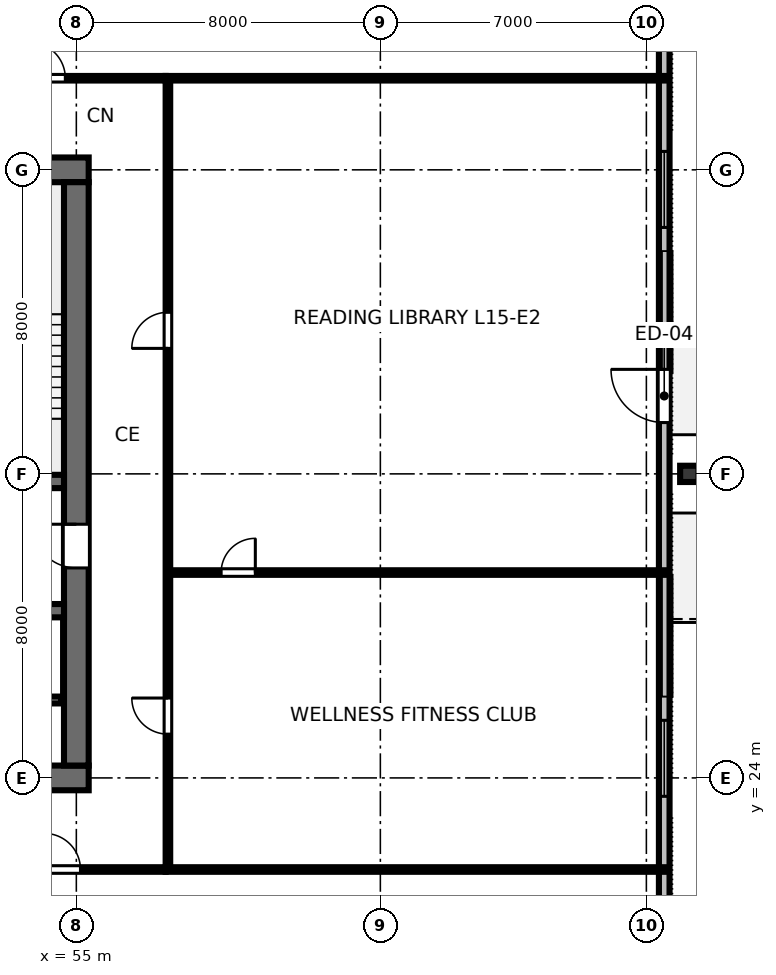
"""IFC4 building model, lengths in metres.
Left out: names, types, materials, properties, quantities, classifications, styles, units other than length and angle.
Written with IfcOpenShell. Run it as: python <this file> out.ifc"""

import sys

from ifc_helpers import new_model, si_unit, direction, frame, frame_2d, origin, origin_2d, place, context, subcontext, project, spatial, rectangle, i_section, extrude, element, fill, save


model = new_model("IFC4")
c1 = context("Model", 3, precision=1e-05, world=origin(), true_north=direction((0.0, 1.0)))
c2 = subcontext(c1, "Body", "Model", "MODEL_VIEW")
j1 = project(units=[si_unit("LENGTHUNIT", "METRE"), si_unit("PLANEANGLEUNIT", "RADIAN")], contexts=[c1])
p1 = place(None, origin())
s1 = spatial("IfcSite", under=j1, at=p1, CompositionType="ELEMENT")
p2 = place(p1, origin())
s2 = spatial("IfcBuilding", under=s1, at=p2, CompositionType="ELEMENT")
p3 = place(p2, frame((0.0, 0.0, 60.4)))
s3 = spatial("IfcBuildingStorey", under=s2, at=p3, CompositionType="ELEMENT", Elevation=60.4)
p4 = place(p3, frame((36.675, 24.0, 0.0), z_axis=(0.0, 0.0, 1.0), x_axis=(1.0, 0.0, 0.0)))
e1 = element("IfcWall", 1, at=p4, inside=s3, PredefinedType="SHEAR", context=c2, shape_type="SweptSolid", body=[
    extrude(rectangle(XDim=18.65, YDim=0.65, at=frame_2d((9.325, 0.0))), origin(), (0.0, 0.0, 1.0), 3.36),
])
p5 = place(p4, frame((5.725, 0.0, 0.0)))
e2 = element("IfcOpeningElement", 2, at=p5, cuts=e1, PredefinedType="OPENING", context=c2, shape_type="SweptSolid", body=[
    extrude(rectangle(XDim=1.6, YDim=2.15, at=frame_2d((0.8, 1.075))), frame((0.0, 0.335, 0.0), z_axis=(0.0, -1.0, 0.0), x_axis=(1.0, 0.0, 0.0)), (0.0, 0.0, 1.0), 0.67),
])
p6 = place(p4, frame((12.125, 0.0, 0.0)))
e3 = element("IfcOpeningElement", 3, at=p6, cuts=e1, PredefinedType="OPENING", context=c2, shape_type="SweptSolid", body=[
    extrude(rectangle(XDim=1.6, YDim=2.15, at=frame_2d((0.8, 1.075))), frame((0.0, 0.335, 0.0), z_axis=(0.0, -1.0, 0.0), x_axis=(1.0, 0.0, 0.0)), (0.0, 0.0, 1.0), 0.67),
])
p7 = place(p3, frame((36.675, 40.0, 0.0), z_axis=(0.0, 0.0, 1.0), x_axis=(1.0, 0.0, 0.0)))
e4 = element("IfcWall", 4, at=p7, inside=s3, PredefinedType="SHEAR", context=c2, shape_type="SweptSolid", body=[
    extrude(rectangle(XDim=18.65, YDim=0.65, at=frame_2d((9.325, 0.0))), origin(), (0.0, 0.0, 1.0), 3.36),
])
p8 = place(p7, frame((8.825, 0.0, 0.0)))
e5 = element("IfcOpeningElement", 5, at=p8, cuts=e4, PredefinedType="OPENING", context=c2, shape_type="SweptSolid", body=[
    extrude(rectangle(XDim=1.0, YDim=2.15, at=frame_2d((0.5, 1.075))), frame((0.0, 0.335, 0.0), z_axis=(0.0, -1.0, 0.0), x_axis=(1.0, 0.0, 0.0)), (0.0, 0.0, 1.0), 0.67),
])
p9 = place(p3, frame((55.0, 24.325, 0.0), z_axis=(0.0, 0.0, 1.0), x_axis=(0.0, 1.0, 0.0)))
e6 = element("IfcWall", 6, at=p9, inside=s3, PredefinedType="SHEAR", context=c2, shape_type="SweptSolid", body=[
    extrude(rectangle(XDim=15.35, YDim=0.65, at=frame_2d((7.675, 0.0))), origin(), (0.0, 0.0, 1.0), 3.36),
])
p10 = place(p9, frame((5.2, 0.0, 0.0)))
e7 = element("IfcOpeningElement", 7, at=p10, cuts=e6, PredefinedType="OPENING", context=c2, shape_type="SweptSolid", body=[
    extrude(rectangle(XDim=1.15, YDim=2.15, at=frame_2d((0.575, 1.075))), frame((0.0, 0.335, 0.0), z_axis=(0.0, -1.0, 0.0), x_axis=(1.0, 0.0, 0.0)), (0.0, 0.0, 1.0), 0.67),
])
p11 = place(p3, frame((37.325, 31.8, 0.0), z_axis=(0.0, 0.0, 1.0), x_axis=(1.0, 0.0, 0.0)))
e8 = element("IfcWall", 8, at=p11, inside=s3, PredefinedType="SHEAR", context=c2, shape_type="SweptSolid", body=[
    extrude(rectangle(XDim=17.35, YDim=0.35, at=frame_2d((8.675, 0.0))), origin(), (0.0, 0.0, 1.0), 3.36),
])
p12 = place(p11, frame((0.725, 0.0, 0.0)))
e9 = element("IfcOpeningElement", 9, at=p12, cuts=e8, PredefinedType="OPENING", context=c2, shape_type="SweptSolid", body=[
    extrude(rectangle(XDim=1.1, YDim=2.15, at=frame_2d((0.55, 1.075))), frame((0.0, 0.185, 0.0), z_axis=(0.0, -1.0, 0.0), x_axis=(1.0, 0.0, 0.0)), (0.0, 0.0, 1.0), 0.37),
])
p13 = place(p11, frame((14.625, 0.0, 0.0)))
e10 = element("IfcOpeningElement", 10, at=p13, cuts=e8, PredefinedType="OPENING", context=c2, shape_type="SweptSolid", body=[
    extrude(rectangle(XDim=1.1, YDim=2.15, at=frame_2d((0.55, 1.075))), frame((0.0, 0.185, 0.0), z_axis=(0.0, -1.0, 0.0), x_axis=(1.0, 0.0, 0.0)), (0.0, 0.0, 1.0), 0.37),
])
p14 = place(p3, frame((37.325, 28.4, 0.0), z_axis=(0.0, 0.0, 1.0), x_axis=(1.0, 0.0, 0.0)))
e11 = element("IfcWall", 11, at=p14, inside=s3, PredefinedType="SHEAR", context=c2, shape_type="SweptSolid", body=[
    extrude(rectangle(XDim=17.35, YDim=0.35, at=frame_2d((8.675, 0.0))), origin(), (0.0, 0.0, 1.0), 3.36),
])
p15 = place(p3, frame((71.13, 32.0, 0.0), z_axis=(0.0, 0.0, 1.0), x_axis=(0.0, 1.0, 0.0)))
e12 = element("IfcColumn", 12, at=p15, inside=s3, PredefinedType="COLUMN", context=c2, shape_type="SweptSolid", body=[
    extrude(i_section(OverallWidth=0.428, OverallDepth=0.483, WebThickness=0.051, FlangeThickness=0.082, FilletRadius=0.025, at=origin_2d()), origin(), (0.0, 0.0, 1.0), 3.358),
])
p16 = place(p3, frame((70.47, 14.06, 0.0), z_axis=(0.0, 0.0, 1.0), x_axis=(0.0, 1.0, 0.0)))
e13 = element("IfcWall", 13, at=p16, inside=s3, PredefinedType="STANDARD", context=c2, shape_type="SweptSolid", body=[
    extrude(rectangle(XDim=35.88, YDim=0.28, at=frame_2d((17.94, 0.0))), origin(), (0.0, 0.0, 1.0), 3.36),
])
p17 = place(p16, frame((19.29, 0.0, 0.0)))
e14 = element("IfcOpeningElement", 14, at=p17, cuts=e13, PredefinedType="OPENING", context=c2, shape_type="SweptSolid", body=[
    extrude(rectangle(XDim=1.4, YDim=2.15, at=frame_2d((0.7, 1.075))), frame((0.0, 0.15, 0.0), z_axis=(0.0, -1.0, 0.0), x_axis=(1.0, 0.0, 0.0)), (0.0, 0.0, 1.0), 0.3),
])
p18 = place(p16, frame((1.971, 0.0, 0.8)))
e15 = element("IfcOpeningElement", 15, at=p18, cuts=e13, PredefinedType="OPENING", context=c2, shape_type="SweptSolid", body=[
    extrude(rectangle(XDim=2.0, YDim=1.95, at=frame_2d((1.0, 0.975))), frame((0.0, 0.15, 0.0), z_axis=(0.0, -1.0, 0.0), x_axis=(1.0, 0.0, 0.0)), (0.0, 0.0, 1.0), 0.3),
])
p19 = place(p16, frame((9.456, 0.0, 0.8)))
e16 = element("IfcOpeningElement", 16, at=p19, cuts=e13, PredefinedType="OPENING", context=c2, shape_type="SweptSolid", body=[
    extrude(rectangle(XDim=2.0, YDim=1.95, at=frame_2d((1.0, 0.975))), frame((0.0, 0.15, 0.0), z_axis=(0.0, -1.0, 0.0), x_axis=(1.0, 0.0, 0.0)), (0.0, 0.0, 1.0), 0.3),
])
p20 = place(p16, frame((24.424, 0.0, 0.8)))
e17 = element("IfcOpeningElement", 17, at=p20, cuts=e13, PredefinedType="OPENING", context=c2, shape_type="SweptSolid", body=[
    extrude(rectangle(XDim=2.0, YDim=1.95, at=frame_2d((1.0, 0.975))), frame((0.0, 0.15, 0.0), z_axis=(0.0, -1.0, 0.0), x_axis=(1.0, 0.0, 0.0)), (0.0, 0.0, 1.0), 0.3),
])
p21 = place(p16, frame((31.909, 0.0, 0.8)))
e18 = element("IfcOpeningElement", 18, at=p21, cuts=e13, PredefinedType="OPENING", context=c2, shape_type="SweptSolid", body=[
    extrude(rectangle(XDim=2.0, YDim=1.95, at=frame_2d((1.0, 0.975))), frame((0.0, 0.15, 0.0), z_axis=(0.0, -1.0, 0.0), x_axis=(1.0, 0.0, 0.0)), (0.0, 0.0, 1.0), 0.3),
])
p22 = place(p3, frame((37.4, 26.05, 0.0), z_axis=(0.0, 0.0, 1.0), x_axis=(1.0, 0.0, 0.0)))
e19 = element("IfcWall", 19, at=p22, inside=s3, PredefinedType="PARTITIONING", context=c2, shape_type="SweptSolid", body=[
    extrude(rectangle(XDim=17.2, YDim=0.18, at=frame_2d((8.6, 0.0))), origin(), (0.0, 0.0, 1.0), 3.36),
])
p23 = place(p22, frame((1.1, 0.0, 0.0)))
e20 = element("IfcOpeningElement", 20, at=p23, cuts=e19, PredefinedType="OPENING", context=c2, shape_type="SweptSolid", body=[
    extrude(rectangle(XDim=1.05, YDim=2.15, at=frame_2d((0.525, 1.075))), frame((0.0, 0.1, 0.0), z_axis=(0.0, -1.0, 0.0), x_axis=(1.0, 0.0, 0.0)), (0.0, 0.0, 1.0), 0.2),
])
p24 = place(p22, frame((3.0, 0.0, 0.0)))
e21 = element("IfcOpeningElement", 21, at=p24, cuts=e19, PredefinedType="OPENING", context=c2, shape_type="SweptSolid", body=[
    extrude(rectangle(XDim=1.05, YDim=2.15, at=frame_2d((0.525, 1.075))), frame((0.0, 0.1, 0.0), z_axis=(0.0, -1.0, 0.0), x_axis=(1.0, 0.0, 0.0)), (0.0, 0.0, 1.0), 0.2),
])
p25 = place(p3, frame((34.65, 21.59, 0.0), z_axis=(0.0, 0.0, 1.0), x_axis=(1.0, 0.0, 0.0)))
e22 = element("IfcWall", 22, at=p25, inside=s3, PredefinedType="PARTITIONING", context=c2, shape_type="SweptSolid", body=[
    extrude(rectangle(XDim=22.7, YDim=0.12, at=frame_2d((11.35, 0.0))), origin(), (0.0, 0.0, 1.0), 2.64),
])
p26 = place(p25, frame((3.365, 0.0, 0.0)))
e23 = element("IfcOpeningElement", 23, at=p26, cuts=e22, PredefinedType="OPENING", context=c2, shape_type="SweptSolid", body=[
    extrude(rectangle(XDim=0.95, YDim=2.15, at=frame_2d((0.475, 1.075))), frame((0.0, 0.07, 0.0), z_axis=(0.0, -1.0, 0.0), x_axis=(1.0, 0.0, 0.0)), (0.0, 0.0, 1.0), 0.14),
])
p27 = place(p25, frame((8.718, 0.0, 0.0)))
e24 = element("IfcOpeningElement", 24, at=p27, cuts=e22, PredefinedType="OPENING", context=c2, shape_type="SweptSolid", body=[
    extrude(rectangle(XDim=0.95, YDim=2.15, at=frame_2d((0.475, 1.075))), frame((0.0, 0.07, 0.0), z_axis=(0.0, -1.0, 0.0), x_axis=(1.0, 0.0, 0.0)), (0.0, 0.0, 1.0), 0.14),
])
p28 = place(p25, frame((13.651, 0.0, 0.0)))
e25 = element("IfcOpeningElement", 25, at=p28, cuts=e22, PredefinedType="OPENING", context=c2, shape_type="SweptSolid", body=[
    extrude(rectangle(XDim=0.95, YDim=2.15, at=frame_2d((0.475, 1.075))), frame((0.0, 0.07, 0.0), z_axis=(0.0, -1.0, 0.0), x_axis=(1.0, 0.0, 0.0)), (0.0, 0.0, 1.0), 0.14),
])
p29 = place(p25, frame((19.509, 0.0, 0.0)))
e26 = element("IfcOpeningElement", 26, at=p29, cuts=e22, PredefinedType="OPENING", context=c2, shape_type="SweptSolid", body=[
    extrude(rectangle(XDim=0.95, YDim=2.15, at=frame_2d((0.475, 1.075))), frame((0.0, 0.07, 0.0), z_axis=(0.0, -1.0, 0.0), x_axis=(1.0, 0.0, 0.0)), (0.0, 0.0, 1.0), 0.14),
])
p30 = place(p3, frame((34.65, 42.41, 0.0), z_axis=(0.0, 0.0, 1.0), x_axis=(1.0, 0.0, 0.0)))
e27 = element("IfcWall", 27, at=p30, inside=s3, PredefinedType="PARTITIONING", context=c2, shape_type="SweptSolid", body=[
    extrude(rectangle(XDim=22.7, YDim=0.12, at=frame_2d((11.35, 0.0))), origin(), (0.0, 0.0, 1.0), 2.64),
])
p31 = place(p30, frame((2.59, 0.0, 0.0)))
e28 = element("IfcOpeningElement", 28, at=p31, cuts=e27, PredefinedType="OPENING", context=c2, shape_type="SweptSolid", body=[
    extrude(rectangle(XDim=0.95, YDim=2.15, at=frame_2d((0.475, 1.075))), frame((0.0, 0.07, 0.0), z_axis=(0.0, -1.0, 0.0), x_axis=(1.0, 0.0, 0.0)), (0.0, 0.0, 1.0), 0.14),
])
p32 = place(p30, frame((8.768, 0.0, 0.0)))
e29 = element("IfcOpeningElement", 29, at=p32, cuts=e27, PredefinedType="OPENING", context=c2, shape_type="SweptSolid", body=[
    extrude(rectangle(XDim=0.95, YDim=2.15, at=frame_2d((0.475, 1.075))), frame((0.0, 0.07, 0.0), z_axis=(0.0, -1.0, 0.0), x_axis=(1.0, 0.0, 0.0)), (0.0, 0.0, 1.0), 0.14),
])
p33 = place(p30, frame((14.079, 0.0, 0.0)))
e30 = element("IfcOpeningElement", 30, at=p33, cuts=e27, PredefinedType="OPENING", context=c2, shape_type="SweptSolid", body=[
    extrude(rectangle(XDim=0.95, YDim=2.15, at=frame_2d((0.475, 1.075))), frame((0.0, 0.07, 0.0), z_axis=(0.0, -1.0, 0.0), x_axis=(1.0, 0.0, 0.0)), (0.0, 0.0, 1.0), 0.14),
])
p34 = place(p30, frame((19.11, 0.0, 0.0)))
e31 = element("IfcOpeningElement", 31, at=p34, cuts=e27, PredefinedType="OPENING", context=c2, shape_type="SweptSolid", body=[
    extrude(rectangle(XDim=0.95, YDim=2.15, at=frame_2d((0.475, 1.075))), frame((0.0, 0.07, 0.0), z_axis=(0.0, -1.0, 0.0), x_axis=(1.0, 0.0, 0.0)), (0.0, 0.0, 1.0), 0.14),
])
p35 = place(p3, frame((57.41, 29.404, 0.0), z_axis=(0.0, 0.0, 1.0), x_axis=(1.0, 0.0, 0.0)))
e32 = element("IfcWall", 32, at=p35, inside=s3, PredefinedType="PARTITIONING", context=c2, shape_type="SweptSolid", body=[
    extrude(rectangle(XDim=13.06, YDim=0.12, at=frame_2d((6.53, 0.0))), origin(), (0.0, 0.0, 1.0), 2.64),
])
p36 = place(p35, frame((1.4, 0.0, 0.0)))
e33 = element("IfcOpeningElement", 33, at=p36, cuts=e32, PredefinedType="OPENING", context=c2, shape_type="SweptSolid", body=[
    extrude(rectangle(XDim=0.9, YDim=2.15, at=frame_2d((0.45, 1.075))), frame((0.0, 0.07, 0.0), z_axis=(0.0, -1.0, 0.0), x_axis=(1.0, 0.0, 0.0)), (0.0, 0.0, 1.0), 0.14),
])
p37 = place(p3, frame((57.41, 21.65, 0.0), z_axis=(0.0, 0.0, 1.0), x_axis=(0.0, 1.0, 0.0)))
e34 = element("IfcWall", 34, at=p37, inside=s3, PredefinedType="PARTITIONING", context=c2, shape_type="SweptSolid", body=[
    extrude(rectangle(XDim=20.7, YDim=0.12, at=frame_2d((10.35, 0.0))), origin(), (0.0, 0.0, 1.0), 2.64),
])
p38 = place(p37, frame((3.502, 0.0, 0.0)))
e35 = element("IfcOpeningElement", 35, at=p38, cuts=e34, PredefinedType="OPENING", context=c2, shape_type="SweptSolid", body=[
    extrude(rectangle(XDim=0.95, YDim=2.15, at=frame_2d((0.475, 1.075))), frame((0.0, 0.07, 0.0), z_axis=(0.0, -1.0, 0.0), x_axis=(1.0, 0.0, 0.0)), (0.0, 0.0, 1.0), 0.14),
])
p39 = place(p37, frame((13.652, 0.0, 0.0)))
e36 = element("IfcOpeningElement", 36, at=p39, cuts=e34, PredefinedType="OPENING", context=c2, shape_type="SweptSolid", body=[
    extrude(rectangle(XDim=0.95, YDim=2.15, at=frame_2d((0.475, 1.075))), frame((0.0, 0.07, 0.0), z_axis=(0.0, -1.0, 0.0), x_axis=(1.0, 0.0, 0.0)), (0.0, 0.0, 1.0), 0.14),
])
for number, where, z_axis, x_axis in (
    (37, (57.35, 21.59, 0.0), (0.0, 0.0, 1.0), (1.0, 0.0, 0.0)),
    (38, (57.35, 42.41, 0.0), (0.0, 0.0, 1.0), (1.0, 0.0, 0.0)),
):
    element("IfcWall", number, at=place(p3, frame(where, z_axis=z_axis, x_axis=x_axis)), inside=s3, PredefinedType="PARTITIONING", context=c2, shape_type="SweptSolid", body=[
        extrude(rectangle(XDim=13.12, YDim=0.12, at=frame_2d((6.56, 0.0))), origin(), (0.0, 0.0, 1.0), 2.64),
    ])
p40 = place(p17, origin())
e39 = element("IfcDoor", 39, at=p40, inside=s3, OperationType="SINGLE_SWING_RIGHT", PredefinedType="DOOR", context=c2, shape_type="SweptSolid", body=[
    extrude(rectangle(XDim=1.4, YDim=2.15, at=frame_2d((0.7, 1.075))), frame((0.0, 0.025, 0.0), z_axis=(0.0, -1.0, 0.0), x_axis=(1.0, 0.0, 0.0)), (0.0, 0.0, 1.0), 0.05),
])
fill(e14, e39)
p41 = place(p19, origin())
e40 = element("IfcWindow", 40, at=p41, inside=s3, PartitioningType="SINGLE_PANEL", PredefinedType="WINDOW", context=c2, shape_type="SweptSolid", body=[
    extrude(rectangle(XDim=2.0, YDim=1.95, at=frame_2d((1.0, 0.975))), frame((0.0, 0.03, 0.0), z_axis=(0.0, -1.0, 0.0), x_axis=(1.0, 0.0, 0.0)), (0.0, 0.0, 1.0), 0.06),
])
fill(e16, e40)
p42 = place(p20, origin())
e41 = element("IfcWindow", 41, at=p42, inside=s3, PartitioningType="SINGLE_PANEL", PredefinedType="WINDOW", context=c2, shape_type="SweptSolid", body=[
    extrude(rectangle(XDim=2.0, YDim=1.95, at=frame_2d((1.0, 0.975))), frame((0.0, 0.03, 0.0), z_axis=(0.0, -1.0, 0.0), x_axis=(1.0, 0.0, 0.0)), (0.0, 0.0, 1.0), 0.06),
])
fill(e17, e41)
p43 = place(p10, origin())
e42 = element("IfcDoor", 42, at=p43, inside=s3, OperationType="SINGLE_SWING_RIGHT", PredefinedType="DOOR", context=c2, shape_type="SweptSolid", body=[
    extrude(rectangle(XDim=1.15, YDim=2.15, at=frame_2d((0.575, 1.075))), frame((0.0, 0.025, 0.0), z_axis=(0.0, -1.0, 0.0), x_axis=(1.0, 0.0, 0.0)), (0.0, 0.0, 1.0), 0.05),
])
fill(e7, e42)
p44 = place(p29, origin())
e43 = element("IfcDoor", 43, at=p44, inside=s3, OperationType="SINGLE_SWING_LEFT", PredefinedType="DOOR", context=c2, shape_type="SweptSolid", body=[
    extrude(rectangle(XDim=0.95, YDim=2.15, at=frame_2d((0.475, 1.075))), frame((0.0, 0.025, 0.0), z_axis=(0.0, -1.0, 0.0), x_axis=(1.0, 0.0, 0.0)), (0.0, 0.0, 1.0), 0.05),
])
fill(e26, e43)
p45 = place(p34, origin())
e44 = element("IfcDoor", 44, at=p45, inside=s3, OperationType="SINGLE_SWING_LEFT", PredefinedType="DOOR", context=c2, shape_type="SweptSolid", body=[
    extrude(rectangle(XDim=0.95, YDim=2.15, at=frame_2d((0.475, 1.075))), frame((0.0, 0.025, 0.0), z_axis=(0.0, -1.0, 0.0), x_axis=(1.0, 0.0, 0.0)), (0.0, 0.0, 1.0), 0.05),
])
fill(e31, e44)
p46 = place(p36, origin())
e45 = element("IfcDoor", 45, at=p46, inside=s3, OperationType="SINGLE_SWING_RIGHT", PredefinedType="DOOR", context=c2, shape_type="SweptSolid", body=[
    extrude(rectangle(XDim=0.9, YDim=2.15, at=frame_2d((0.45, 1.075))), frame((0.0, 0.025, 0.0), z_axis=(0.0, -1.0, 0.0), x_axis=(1.0, 0.0, 0.0)), (0.0, 0.0, 1.0), 0.05),
])
fill(e33, e45)
p47 = place(p38, origin())
e46 = element("IfcDoor", 46, at=p47, inside=s3, OperationType="SINGLE_SWING_RIGHT", PredefinedType="DOOR", context=c2, shape_type="SweptSolid", body=[
    extrude(rectangle(XDim=0.95, YDim=2.15, at=frame_2d((0.475, 1.075))), frame((0.0, 0.025, 0.0), z_axis=(0.0, -1.0, 0.0), x_axis=(1.0, 0.0, 0.0)), (0.0, 0.0, 1.0), 0.05),
])
fill(e35, e46)
p48 = place(p39, origin())
e47 = element("IfcDoor", 47, at=p48, inside=s3, OperationType="SINGLE_SWING_LEFT", PredefinedType="DOOR", context=c2, shape_type="SweptSolid", body=[
    extrude(rectangle(XDim=0.95, YDim=2.15, at=frame_2d((0.475, 1.075))), frame((0.0, 0.025, 0.0), z_axis=(0.0, -1.0, 0.0), x_axis=(1.0, 0.0, 0.0)), (0.0, 0.0, 1.0), 0.05),
])
fill(e36, e47)
save(model, sys.argv[1])
